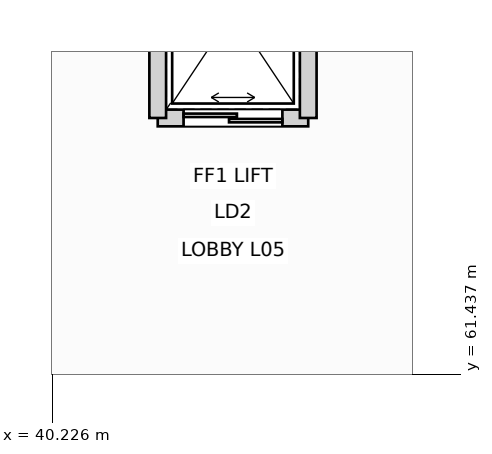
"""IFC4 building model, lengths in metres.
Left out: names, types, materials, properties, quantities, classifications, styles, units other than length and angle.
Written with IfcOpenShell. Run it as: python <this file> out.ifc"""

import sys

from ifc_helpers import new_model, si_unit, direction, frame, frame_2d, origin, place, context, subcontext, project, spatial, rectangle, extrude, element, fill, save


model = new_model("IFC4")
c1 = context("Model", 3, precision=1e-05, world=origin(), true_north=direction((0.0, 1.0)))
c2 = subcontext(c1, "Body", "Model", "MODEL_VIEW")
j1 = project(units=[si_unit("LENGTHUNIT", "METRE"), si_unit("PLANEANGLEUNIT", "RADIAN")], contexts=[c1])
p1 = place(None, origin())
s1 = spatial("IfcSite", under=j1, at=p1, CompositionType="ELEMENT")
p2 = place(p1, origin())
s2 = spatial("IfcBuilding", under=s1, at=p2, CompositionType="ELEMENT")
p3 = place(p2, frame((0.0, 0.0, 26.4)))
s3 = spatial("IfcBuildingStorey", under=s2, at=p3, CompositionType="ELEMENT", Elevation=26.4)
p4 = place(p3, frame((41.61, 64.81, 0.0), z_axis=(0.0, 0.0, 1.0), x_axis=(1.0, 0.0, 0.0)))
e1 = element("IfcWall", 1, at=p4, inside=s3, PredefinedType="PARTITIONING", context=c2, shape_type="SweptSolid", body=[
    extrude(rectangle(XDim=1.98, YDim=0.22, at=frame_2d((0.99, 0.0))), origin(), (0.0, 0.0, 1.0), 3.905),
])
p5 = place(p4, frame((0.34, 0.0, 0.0)))
e2 = element("IfcOpeningElement", 2, at=p5, cuts=e1, PredefinedType="OPENING", context=c2, shape_type="SweptSolid", body=[
    extrude(rectangle(XDim=1.3, YDim=2.2, at=frame_2d((0.65, 1.1))), frame((0.0, 0.12, 0.0), z_axis=(0.0, -1.0, 0.0), x_axis=(1.0, 0.0, 0.0)), (0.0, 0.0, 1.0), 0.24),
])
for number, where, z_axis, x_axis in (
    (3, (41.61, 64.81, 0.0), (0.0, 0.0, 1.0), (0.0, 1.0, 0.0)),
    (4, (43.59, 64.81, 0.0), (0.0, 0.0, 1.0), (0.0, 1.0, 0.0)),
):
    element("IfcWall", number, at=place(p3, frame(where, z_axis=z_axis, x_axis=x_axis)), inside=s3, PredefinedType="PARTITIONING", context=c2, shape_type="SweptSolid", body=[
        extrude(rectangle(XDim=2.78, YDim=0.22, at=frame_2d((1.39, 0.0))), origin(), (0.0, 0.0, 1.0), 3.635),
    ])
p6 = place(p5, origin())
e5 = element("IfcDoor", 5, at=p6, inside=s3, OperationType="DOUBLE_DOOR_SLIDING", PredefinedType="DOOR", context=c2, shape_type="SweptSolid", body=[
    extrude(rectangle(XDim=1.3, YDim=2.2, at=frame_2d((0.65, 1.1))), frame((0.0, 0.025, 0.0), z_axis=(0.0, -1.0, 0.0), x_axis=(1.0, 0.0, 0.0)), (0.0, 0.0, 1.0), 0.05),
])
fill(e2, e5)
save(model, sys.argv[1])
